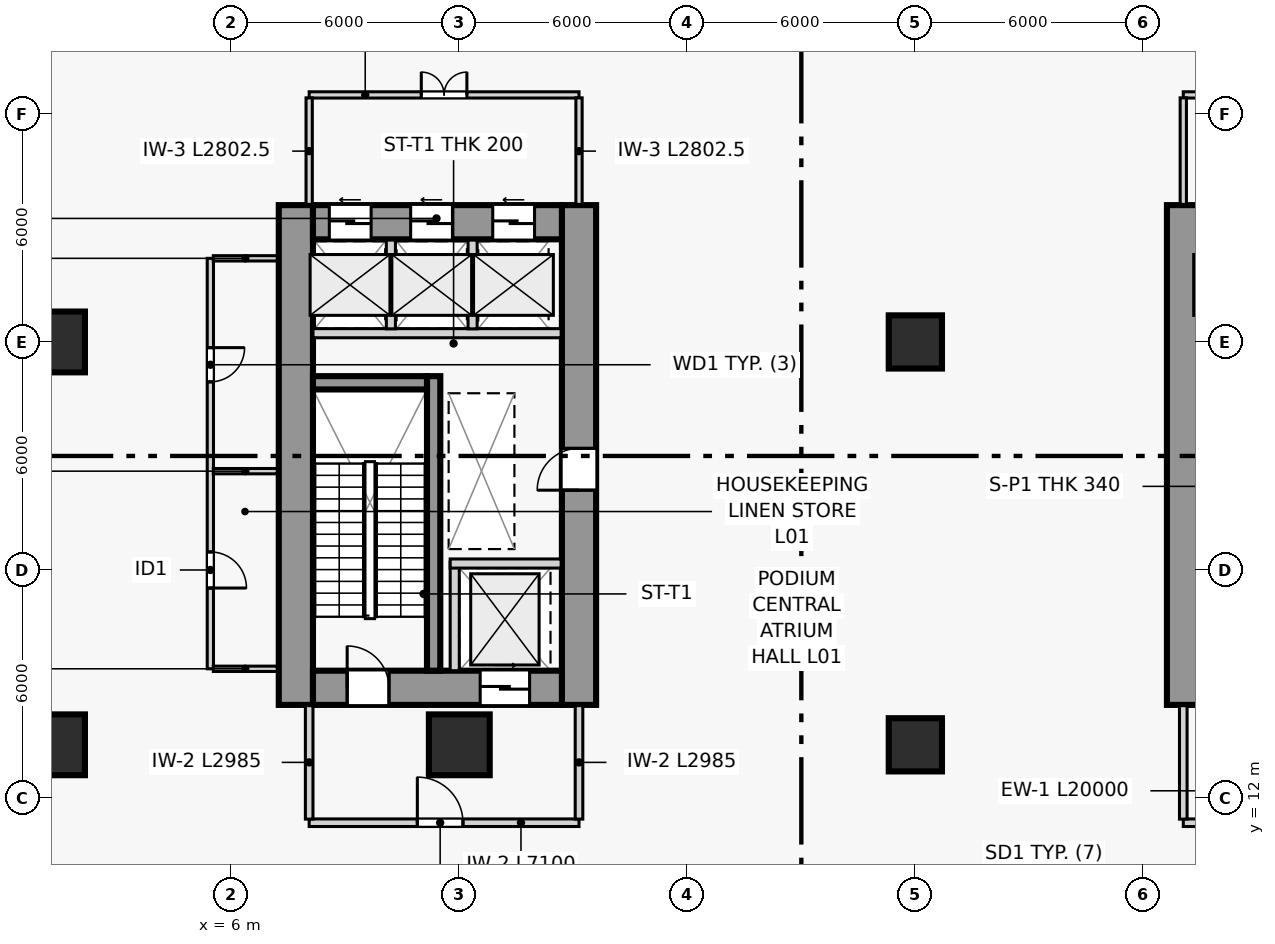
"""IFC4 building model, lengths in metres.
Left out: names, types, materials, properties, quantities, classifications, styles, units other than length and angle.
Written with IfcOpenShell. Run it as: python <this file> out.ifc"""

import sys

from ifc_helpers import new_model, si_unit, direction, frame, frame_2d, origin, origin_2d, place, context, subcontext, project, spatial, rectangle, extrude, source, transform, mapped, element, fill, save


model = new_model("IFC4")
c1 = context("Model", 3, precision=1e-05, world=origin(), true_north=direction((0.0, 1.0)))
c2 = subcontext(c1, "Body", "Model", "MODEL_VIEW")
j1 = project(units=[si_unit("LENGTHUNIT", "METRE"), si_unit("PLANEANGLEUNIT", "RADIAN")], contexts=[c1])
p1 = place(None, origin())
s1 = spatial("IfcSite", under=j1, at=p1, CompositionType="ELEMENT")
p2 = place(p1, origin())
s2 = spatial("IfcBuilding", under=s1, at=p2, CompositionType="ELEMENT")
p3 = place(p2, frame((0.0, 0.0, 4.5)))
s3 = spatial("IfcBuildingStorey", under=s2, at=p3, CompositionType="ELEMENT", Elevation=4.5)
p4 = place(p3, frame((7.7, 14.45, 0.0), z_axis=(0.0, 0.0, 1.0), x_axis=(0.0, 1.0, 0.0)))
e1 = element("IfcWall", 1, at=p4, inside=s3, PredefinedType="SHEAR", context=c2, shape_type="SweptSolid", body=[
    extrude(rectangle(XDim=13.15, YDim=0.9, at=frame_2d((6.575, 0.0))), origin(), (0.0, 0.0, 1.0), 4.5),
])
p5 = place(p3, frame((15.15, 14.45, 0.0), z_axis=(0.0, 0.0, 1.0), x_axis=(0.0, 1.0, 0.0)))
e2 = element("IfcWall", 2, at=p5, inside=s3, PredefinedType="SHEAR", context=c2, shape_type="SweptSolid", body=[
    extrude(rectangle(XDim=13.15, YDim=0.9, at=frame_2d((6.575, 0.0))), origin(), (0.0, 0.0, 1.0), 4.5),
])
p6 = place(p5, frame((5.65, 0.0, 0.0)))
e3 = element("IfcOpeningElement", 3, at=p6, cuts=e2, PredefinedType="OPENING", context=c2, shape_type="SweptSolid", body=[
    extrude(rectangle(XDim=1.1, YDim=2.2, at=frame_2d((0.55, 1.1))), frame((0.0, 0.46, 0.0), z_axis=(0.0, -1.0, 0.0), x_axis=(1.0, 0.0, 0.0)), (0.0, 0.0, 1.0), 0.92),
])
p7 = place(p3, frame((8.15, 14.9, 0.0), z_axis=(0.0, 0.0, 1.0), x_axis=(1.0, 0.0, 0.0)))
e4 = element("IfcWall", 4, at=p7, inside=s3, PredefinedType="SHEAR", context=c2, shape_type="SweptSolid", body=[
    extrude(rectangle(XDim=6.55, YDim=0.9, at=frame_2d((3.275, 0.0))), origin(), (0.0, 0.0, 1.0), 4.5),
])
p8 = place(p7, frame((0.9, 0.0, 0.0)))
e5 = element("IfcOpeningElement", 5, at=p8, cuts=e4, PredefinedType="OPENING", context=c2, shape_type="SweptSolid", body=[
    extrude(rectangle(XDim=1.1, YDim=2.2, at=frame_2d((0.55, 1.1))), frame((0.0, 0.46, 0.0), z_axis=(0.0, -1.0, 0.0), x_axis=(1.0, 0.0, 0.0)), (0.0, 0.0, 1.0), 0.92),
])
p9 = place(p7, frame((4.4, 0.0, 0.0)))
e6 = element("IfcOpeningElement", 6, at=p9, cuts=e4, PredefinedType="OPENING", context=c2, shape_type="SweptSolid", body=[
    extrude(rectangle(XDim=1.3, YDim=2.2, at=frame_2d((0.65, 1.1))), frame((0.0, 0.46, 0.0), z_axis=(0.0, -1.0, 0.0), x_axis=(1.0, 0.0, 0.0)), (0.0, 0.0, 1.0), 0.92),
])
p10 = place(p3, frame((8.15, 27.15, 0.0), z_axis=(0.0, 0.0, 1.0), x_axis=(1.0, 0.0, 0.0)))
e7 = element("IfcWall", 7, at=p10, inside=s3, PredefinedType="SHEAR", context=c2, shape_type="SweptSolid", body=[
    extrude(rectangle(XDim=6.55, YDim=0.9, at=frame_2d((3.275, 0.0))), origin(), (0.0, 0.0, 1.0), 4.5),
])
p11 = place(p10, frame((0.43, 0.0, 0.0)))
e8 = element("IfcOpeningElement", 8, at=p11, cuts=e7, PredefinedType="OPENING", context=c2, shape_type="SweptSolid", body=[
    extrude(rectangle(XDim=1.1, YDim=2.2, at=frame_2d((0.55, 1.1))), frame((0.0, 0.46, 0.0), z_axis=(0.0, -1.0, 0.0), x_axis=(1.0, 0.0, 0.0)), (0.0, 0.0, 1.0), 0.92),
])
p12 = place(p10, frame((2.57, 0.0, 0.0)))
e9 = element("IfcOpeningElement", 9, at=p12, cuts=e7, PredefinedType="OPENING", context=c2, shape_type="SweptSolid", body=[
    extrude(rectangle(XDim=1.1, YDim=2.2, at=frame_2d((0.55, 1.1))), frame((0.0, 0.46, 0.0), z_axis=(0.0, -1.0, 0.0), x_axis=(1.0, 0.0, 0.0)), (0.0, 0.0, 1.0), 0.92),
])
p13 = place(p10, frame((4.73, 0.0, 0.0)))
e10 = element("IfcOpeningElement", 10, at=p13, cuts=e7, PredefinedType="OPENING", context=c2, shape_type="SweptSolid", body=[
    extrude(rectangle(XDim=1.1, YDim=2.2, at=frame_2d((0.55, 1.1))), frame((0.0, 0.46, 0.0), z_axis=(0.0, -1.0, 0.0), x_axis=(1.0, 0.0, 0.0)), (0.0, 0.0, 1.0), 0.92),
])
p14 = place(p3, frame((31.07, 14.45, 0.0), z_axis=(0.0, 0.0, 1.0), x_axis=(0.0, 1.0, 0.0)))
e11 = element("IfcWall", 11, at=p14, inside=s3, PredefinedType="SHEAR", context=c2, shape_type="SweptSolid", body=[
    extrude(rectangle(XDim=13.15, YDim=0.9, at=frame_2d((6.575, 0.0))), origin(), (0.0, 0.0, 1.0), 4.5),
])
p15 = place(p3, frame((11.325, 15.35, 0.0), z_axis=(0.0, 0.0, 1.0), x_axis=(0.0, 1.0, 0.0)))
e12 = element("IfcWall", 12, at=p15, inside=s3, PredefinedType="SHEAR", context=c2, shape_type="SweptSolid", body=[
    extrude(rectangle(XDim=7.75, YDim=0.35, at=frame_2d((3.875, 0.0))), origin(), (0.0, 0.0, 1.0), 4.5),
])
p16 = place(p3, frame((8.15, 22.925, 0.0), z_axis=(0.0, 0.0, 1.0), x_axis=(1.0, 0.0, 0.0)))
e13 = element("IfcWall", 13, at=p16, inside=s3, PredefinedType="SHEAR", context=c2, shape_type="SweptSolid", body=[
    extrude(rectangle(XDim=3.0, YDim=0.35, at=frame_2d((1.5, 0.0))), origin(), (0.0, 0.0, 1.0), 4.5),
])
m1 = source(origin(), c2, "Body", "SweptSolid", [
    extrude(rectangle(XDim=1.6, YDim=1.6, at=origin_2d()), origin(), (0.0, 0.0, 1.0), 4.5),
])
for number, where, z_axis, x_axis in (
    (14, (1.35, 13.4, 0.0), (0.0, 0.0, 1.0), (1.0, 0.0, 0.0)),
    (15, (1.35, 24.0, 0.0), (0.0, 0.0, 1.0), (1.0, 0.0, 0.0)),
    (16, (12.0, 13.4, 0.0), (0.0, 0.0, 1.0), (1.0, 0.0, 0.0)),
):
    element("IfcColumn", number, at=place(p3, frame(where, z_axis=z_axis, x_axis=x_axis)), inside=s3, PredefinedType="COLUMN", context=c2, shape_type="MappedRepresentation", body=[
        mapped(m1, transform((0.0, 0.0, 0.0), scale=1.0)),
    ])
m2 = source(origin(), c2, "Body", "SweptSolid", [
    extrude(rectangle(XDim=1.4, YDim=1.4, at=origin_2d()), origin(), (0.0, 0.0, 1.0), 4.5),
])
for number, where, z_axis, x_axis in (
    (17, (24.0, 13.4, 0.0), (0.0, 0.0, 1.0), (1.0, 0.0, 0.0)),
    (18, (24.0, 24.0, 0.0), (0.0, 0.0, 1.0), (1.0, 0.0, 0.0)),
):
    element("IfcColumn", number, at=place(p3, frame(where, z_axis=z_axis, x_axis=x_axis)), inside=s3, PredefinedType="COLUMN", context=c2, shape_type="MappedRepresentation", body=[
        mapped(m2, transform((0.0, 0.0, 0.0), scale=1.0)),
    ])
p17 = place(p3, frame((11.88, 15.35, 0.0), z_axis=(0.0, 0.0, 1.0), x_axis=(0.0, 1.0, 0.0)))
e19 = element("IfcWall", 19, at=p17, inside=s3, PredefinedType="PARTITIONING", context=c2, shape_type="SweptSolid", body=[
    extrude(rectangle(XDim=2.85, YDim=0.24, at=frame_2d((1.425, 0.0))), origin(), (0.0, 0.0, 1.0), 4.16),
])
p18 = place(p3, frame((11.76, 18.17, 0.0), z_axis=(0.0, 0.0, 1.0), x_axis=(1.0, 0.0, 0.0)))
e20 = element("IfcWall", 20, at=p18, inside=s3, PredefinedType="PARTITIONING", context=c2, shape_type="SweptSolid", body=[
    extrude(rectangle(XDim=2.92, YDim=0.24, at=frame_2d((1.46, 0.0))), origin(), (0.0, 0.0, 1.0), 4.16),
])
p19 = place(p3, frame((8.05, 11.35, 0.0), z_axis=(0.0, 0.0, 1.0), x_axis=(1.0, 0.0, 0.0)))
e21 = element("IfcWall", 21, at=p19, inside=s3, PredefinedType="PARTITIONING", context=c2, shape_type="SweptSolid", body=[
    extrude(rectangle(XDim=7.1, YDim=0.2, at=frame_2d((3.55, 0.0))), origin(), (0.0, 0.0, 1.0), 4.16),
])
p20 = place(p19, frame((2.846, 0.0, 0.0)))
e22 = element("IfcOpeningElement", 22, at=p20, cuts=e21, PredefinedType="OPENING", context=c2, shape_type="SweptSolid", body=[
    extrude(rectangle(XDim=1.2, YDim=2.2, at=frame_2d((0.6, 1.1))), frame((0.0, 0.11, 0.0), z_axis=(0.0, -1.0, 0.0), x_axis=(1.0, 0.0, 0.0)), (0.0, 0.0, 1.0), 0.22),
])
for number, where, z_axis, x_axis in (
    (23, (8.05, 11.445, 0.0), (0.0, 0.0, 1.0), (0.0, 1.0, 0.0)),
    (24, (15.15, 11.445, 0.0), (0.0, 0.0, 1.0), (0.0, 1.0, 0.0)),
):
    element("IfcWall", number, at=place(p3, frame(where, z_axis=z_axis, x_axis=x_axis)), inside=s3, PredefinedType="PARTITIONING", context=c2, shape_type="SweptSolid", body=[
        extrude(rectangle(XDim=2.985, YDim=0.2, at=frame_2d((1.492, 0.0))), origin(), (0.0, 0.0, 1.0), 4.16),
    ])
p21 = place(p3, frame((31.05, 11.35, 0.0), z_axis=(0.0, 0.0, 1.0), x_axis=(1.0, 0.0, 0.0)))
e25 = element("IfcWall", 25, at=p21, inside=s3, PredefinedType="PARTITIONING", context=c2, shape_type="SweptSolid", body=[
    extrude(rectangle(XDim=6.2, YDim=0.2, at=frame_2d((3.1, 0.0))), origin(), (0.0, 0.0, 1.0), 4.16),
])
p22 = place(p21, frame((2.586, 0.0, 0.0)))
e26 = element("IfcOpeningElement", 26, at=p22, cuts=e25, PredefinedType="OPENING", context=c2, shape_type="SweptSolid", body=[
    extrude(rectangle(XDim=1.2, YDim=2.2, at=frame_2d((0.6, 1.1))), frame((0.0, 0.11, 0.0), z_axis=(0.0, -1.0, 0.0), x_axis=(1.0, 0.0, 0.0)), (0.0, 0.0, 1.0), 0.22),
])
p23 = place(p3, frame((31.05, 11.445, 0.0), z_axis=(0.0, 0.0, 1.0), x_axis=(0.0, 1.0, 0.0)))
e27 = element("IfcWall", 27, at=p23, inside=s3, PredefinedType="PARTITIONING", context=c2, shape_type="SweptSolid", body=[
    extrude(rectangle(XDim=2.985, YDim=0.2, at=frame_2d((1.492, 0.0))), origin(), (0.0, 0.0, 1.0), 4.16),
])
p24 = place(p3, frame((8.15, 24.23, 0.0), z_axis=(0.0, 0.0, 1.0), x_axis=(1.0, 0.0, 0.0)))
e28 = element("IfcWall", 28, at=p24, inside=s3, PredefinedType="PARTITIONING", context=c2, shape_type="SweptSolid", body=[
    extrude(rectangle(XDim=6.53, YDim=0.24, at=frame_2d((3.265, 0.0))), origin(), (0.0, 0.0, 1.0), 4.16),
])
for number, where, z_axis, x_axis in (
    (29, (10.2, 24.345, 0.0), (0.0, 0.0, 1.0), (0.0, 1.0, 0.0)),
    (30, (12.35, 24.345, 0.0), (0.0, 0.0, 1.0), (0.0, 1.0, 0.0)),
):
    element("IfcWall", number, at=place(p3, frame(where, z_axis=z_axis, x_axis=x_axis)), inside=s3, PredefinedType="PARTITIONING", context=c2, shape_type="SweptSolid", body=[
        extrude(rectangle(XDim=2.335, YDim=0.24, at=frame_2d((1.167, 0.0))), origin(), (0.0, 0.0, 1.0), 4.16),
    ])
p25 = place(p3, frame((8.05, 30.5, 0.0), z_axis=(0.0, 0.0, 1.0), x_axis=(1.0, 0.0, 0.0)))
e31 = element("IfcWall", 31, at=p25, inside=s3, PredefinedType="PARTITIONING", context=c2, shape_type="SweptSolid", body=[
    extrude(rectangle(XDim=7.1, YDim=0.165, at=frame_2d((3.55, 0.0))), origin(), (0.0, 0.0, 1.0), 4.16),
])
p26 = place(p25, frame((2.95, 0.0, 0.0)))
e32 = element("IfcOpeningElement", 32, at=p26, cuts=e31, PredefinedType="OPENING", context=c2, shape_type="SweptSolid", body=[
    extrude(rectangle(XDim=1.2, YDim=2.2, at=frame_2d((0.6, 1.1))), frame((0.0, 0.093, 0.0), z_axis=(0.0, -1.0, 0.0), x_axis=(1.0, 0.0, 0.0)), (0.0, 0.0, 1.0), 0.185),
])
for number, where, z_axis, x_axis in (
    (33, (8.05, 27.62, 0.0), (0.0, 0.0, 1.0), (0.0, 1.0, 0.0)),
    (34, (15.15, 27.62, 0.0), (0.0, 0.0, 1.0), (0.0, 1.0, 0.0)),
):
    element("IfcWall", number, at=place(p3, frame(where, z_axis=z_axis, x_axis=x_axis)), inside=s3, PredefinedType="PARTITIONING", context=c2, shape_type="SweptSolid", body=[
        extrude(rectangle(XDim=2.802, YDim=0.165, at=frame_2d((1.401, 0.0))), origin(), (0.0, 0.0, 1.0), 4.16),
    ])
p27 = place(p3, frame((31.05, 30.5, 0.0), z_axis=(0.0, 0.0, 1.0), x_axis=(1.0, 0.0, 0.0)))
e35 = element("IfcWall", 35, at=p27, inside=s3, PredefinedType="PARTITIONING", context=c2, shape_type="SweptSolid", body=[
    extrude(rectangle(XDim=6.2, YDim=0.165, at=frame_2d((3.1, 0.0))), origin(), (0.0, 0.0, 1.0), 4.16),
])
p28 = place(p27, frame((2.5, 0.0, 0.0)))
e36 = element("IfcOpeningElement", 36, at=p28, cuts=e35, PredefinedType="OPENING", context=c2, shape_type="SweptSolid", body=[
    extrude(rectangle(XDim=1.2, YDim=2.2, at=frame_2d((0.6, 1.1))), frame((0.0, 0.093, 0.0), z_axis=(0.0, -1.0, 0.0), x_axis=(1.0, 0.0, 0.0)), (0.0, 0.0, 1.0), 0.185),
])
p29 = place(p3, frame((31.05, 27.62, 0.0), z_axis=(0.0, 0.0, 1.0), x_axis=(0.0, 1.0, 0.0)))
e37 = element("IfcWall", 37, at=p29, inside=s3, PredefinedType="PARTITIONING", context=c2, shape_type="SweptSolid", body=[
    extrude(rectangle(XDim=2.802, YDim=0.165, at=frame_2d((1.401, 0.0))), origin(), (0.0, 0.0, 1.0), 4.16),
])
p30 = place(p3, frame((5.45, 15.4, 0.0), z_axis=(0.0, 0.0, 1.0), x_axis=(0.0, 1.0, 0.0)))
e38 = element("IfcWall", 38, at=p30, inside=s3, PredefinedType="PARTITIONING", context=c2, shape_type="SweptSolid", body=[
    extrude(rectangle(XDim=10.8, YDim=0.165, at=frame_2d((5.4, 0.0))), origin(), (0.0, 0.0, 1.0), 4.16),
])
p31 = place(p30, frame((2.125, 0.0, 0.0)))
e39 = element("IfcOpeningElement", 39, at=p31, cuts=e38, PredefinedType="OPENING", context=c2, shape_type="SweptSolid", body=[
    extrude(rectangle(XDim=0.95, YDim=2.1, at=frame_2d((0.475, 1.05))), frame((0.0, 0.093, 0.0), z_axis=(0.0, -1.0, 0.0), x_axis=(1.0, 0.0, 0.0)), (0.0, 0.0, 1.0), 0.185),
])
p32 = place(p30, frame((7.55, 0.0, 0.0)))
e40 = element("IfcOpeningElement", 40, at=p32, cuts=e38, PredefinedType="OPENING", context=c2, shape_type="SweptSolid", body=[
    extrude(rectangle(XDim=0.9, YDim=2.1, at=frame_2d((0.45, 1.05))), frame((0.0, 0.093, 0.0), z_axis=(0.0, -1.0, 0.0), x_axis=(1.0, 0.0, 0.0)), (0.0, 0.0, 1.0), 0.185),
])
for number, where, z_axis, x_axis in (
    (41, (5.528, 15.4, 0.0), (0.0, 0.0, 1.0), (1.0, 0.0, 0.0)),
    (42, (5.528, 26.2, 0.0), (0.0, 0.0, 1.0), (1.0, 0.0, 0.0)),
):
    element("IfcWall", number, at=place(p3, frame(where, z_axis=z_axis, x_axis=x_axis)), inside=s3, PredefinedType="PARTITIONING", context=c2, shape_type="SweptSolid", body=[
        extrude(rectangle(XDim=1.682, YDim=0.14, at=frame_2d((0.841, 0.0))), origin(), (0.0, 0.0, 1.0), 4.16),
    ])
p33 = place(p3, frame((5.528, 20.6, 0.0), z_axis=(0.0, 0.0, 1.0), x_axis=(1.0, 0.0, 0.0)))
e43 = element("IfcWall", 43, at=p33, inside=s3, PredefinedType="PLUMBINGWALL", context=c2, shape_type="SweptSolid", body=[
    extrude(rectangle(XDim=1.682, YDim=0.14, at=frame_2d((0.841, 0.0))), origin(), (0.0, 0.0, 1.0), 4.16),
])
m3 = source(origin(), c2, "Body", "SweptSolid", [
    extrude(rectangle(XDim=1.1, YDim=2.2, at=frame_2d((0.55, 1.1))), frame((0.0, 0.025, 0.0), z_axis=(0.0, -1.0, 0.0), x_axis=(1.0, 0.0, 0.0)), (0.0, 0.0, 1.0), 0.05),
])
p34 = place(p8, origin())
e44 = element("IfcDoor", 44, at=p34, inside=s3, OperationType="SINGLE_SWING_LEFT", PredefinedType="DOOR", context=c2, shape_type="MappedRepresentation", body=[
    mapped(m3, transform((0.0, 0.0, 0.0), scale=1.0)),
])
fill(e5, e44)
m4 = source(origin(), c2, "Body", "SweptSolid", [
    extrude(rectangle(XDim=1.3, YDim=2.2, at=frame_2d((0.65, 1.1))), frame((0.0, 0.025, 0.0), z_axis=(0.0, -1.0, 0.0), x_axis=(1.0, 0.0, 0.0)), (0.0, 0.0, 1.0), 0.05),
])
p35 = place(p9, origin())
e45 = element("IfcDoor", 45, at=p35, inside=s3, OperationType="SLIDING_TO_RIGHT", PredefinedType="DOOR", context=c2, shape_type="MappedRepresentation", body=[
    mapped(m4, transform((0.0, 0.0, 0.0), scale=1.0)),
])
fill(e6, e45)
m5 = source(origin(), c2, "Body", "SweptSolid", [
    extrude(rectangle(XDim=1.2, YDim=2.2, at=frame_2d((0.6, 1.1))), frame((0.0, 0.025, 0.0), z_axis=(0.0, -1.0, 0.0), x_axis=(1.0, 0.0, 0.0)), (0.0, 0.0, 1.0), 0.05),
])
p36 = place(p20, origin())
e46 = element("IfcDoor", 46, at=p36, inside=s3, OperationType="SINGLE_SWING_LEFT", PredefinedType="DOOR", context=c2, shape_type="MappedRepresentation", body=[
    mapped(m5, transform((0.0, 0.0, 0.0), scale=1.0)),
])
fill(e22, e46)
m6 = source(origin(), c2, "Body", "SweptSolid", [
    extrude(rectangle(XDim=1.1, YDim=2.2, at=frame_2d((0.55, 1.1))), frame((0.0, 0.025, 0.0), z_axis=(0.0, -1.0, 0.0), x_axis=(1.0, 0.0, 0.0)), (0.0, 0.0, 1.0), 0.05),
])
p37 = place(p11, origin())
e47 = element("IfcDoor", 47, at=p37, inside=s3, OperationType="SLIDING_TO_LEFT", PredefinedType="DOOR", context=c2, shape_type="MappedRepresentation", body=[
    mapped(m6, transform((0.0, 0.0, 0.0), scale=1.0)),
])
fill(e8, e47)
p38 = place(p12, origin())
e48 = element("IfcDoor", 48, at=p38, inside=s3, OperationType="SLIDING_TO_LEFT", PredefinedType="DOOR", context=c2, shape_type="MappedRepresentation", body=[
    mapped(m6, transform((0.0, 0.0, 0.0), scale=1.0)),
])
fill(e9, e48)
p39 = place(p13, origin())
e49 = element("IfcDoor", 49, at=p39, inside=s3, OperationType="SLIDING_TO_LEFT", PredefinedType="DOOR", context=c2, shape_type="MappedRepresentation", body=[
    mapped(m6, transform((0.0, 0.0, 0.0), scale=1.0)),
])
fill(e10, e49)
p40 = place(p26, origin())
e50 = element("IfcDoor", 50, at=p40, inside=s3, OperationType="DOUBLE_DOOR_SINGLE_SWING", PredefinedType="DOOR", context=c2, shape_type="MappedRepresentation", body=[
    mapped(m5, transform((0.0, 0.0, 0.0), scale=1.0)),
])
fill(e32, e50)
p41 = place(p6, origin())
e51 = element("IfcDoor", 51, at=p41, inside=s3, OperationType="SINGLE_SWING_LEFT", PredefinedType="DOOR", context=c2, shape_type="MappedRepresentation", body=[
    mapped(m3, transform((0.0, 0.0, 0.0), scale=1.0)),
])
fill(e3, e51)
m7 = source(origin(), c2, "Body", "SweptSolid", [
    extrude(rectangle(XDim=0.95, YDim=2.1, at=frame_2d((0.475, 1.05))), frame((0.0, 0.025, 0.0), z_axis=(0.0, -1.0, 0.0), x_axis=(1.0, 0.0, 0.0)), (0.0, 0.0, 1.0), 0.05),
])
p42 = place(p31, frame((0.95, 0.0, 0.0), z_axis=(0.0, 0.0, 1.0), x_axis=(-1.0, 0.0, 0.0)))
e52 = element("IfcDoor", 52, at=p42, inside=s3, OperationType="SINGLE_SWING_RIGHT", PredefinedType="DOOR", context=c2, shape_type="MappedRepresentation", body=[
    mapped(m7, transform((0.0, 0.0, 0.0), scale=1.0)),
])
fill(e39, e52)
m8 = source(origin(), c2, "Body", "SweptSolid", [
    extrude(rectangle(XDim=0.9, YDim=2.1, at=frame_2d((0.45, 1.05))), frame((0.0, 0.025, 0.0), z_axis=(0.0, -1.0, 0.0), x_axis=(1.0, 0.0, 0.0)), (0.0, 0.0, 1.0), 0.05),
])
p43 = place(p32, frame((0.9, 0.0, 0.0), z_axis=(0.0, 0.0, 1.0), x_axis=(-1.0, 0.0, 0.0)))
e53 = element("IfcDoor", 53, at=p43, inside=s3, OperationType="SINGLE_SWING_LEFT", PredefinedType="DOOR", context=c2, shape_type="MappedRepresentation", body=[
    mapped(m8, transform((0.0, 0.0, 0.0), scale=1.0)),
])
fill(e40, e53)
save(model, sys.argv[1])
